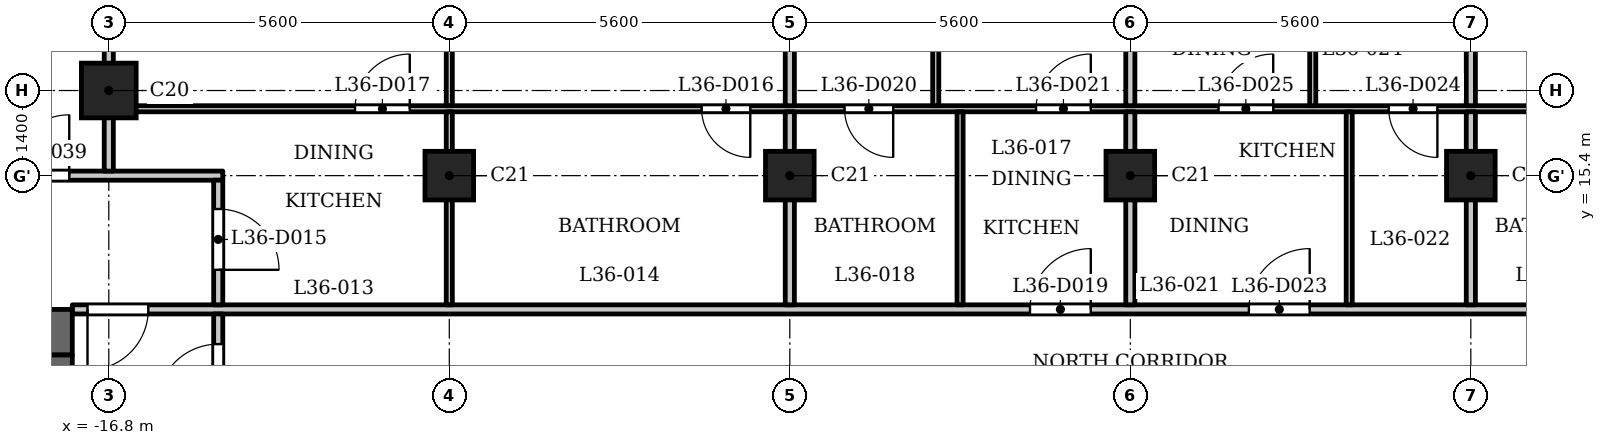
"""IFC4 building model, lengths in metres.
Left out: names, types, materials, properties, quantities, classifications, styles, units other than length and angle.
Written with IfcOpenShell. Run it as: python <this file> out.ifc"""

import sys

from ifc_helpers import new_model, si_unit, direction, frame, frame_2d, origin, origin_2d, place, context, subcontext, project, spatial, rectangle, extrude, element, fill, save


model = new_model("IFC4")
c1 = context("Model", 3, precision=1e-05, world=origin(), true_north=direction((0.0, 1.0)))
c2 = subcontext(c1, "Body", "Model", "MODEL_VIEW")
j1 = project(units=[si_unit("LENGTHUNIT", "METRE"), si_unit("PLANEANGLEUNIT", "RADIAN")], contexts=[c1])
p1 = place(None, origin())
s1 = spatial("IfcSite", under=j1, at=p1, CompositionType="ELEMENT")
p2 = place(p1, origin())
s2 = spatial("IfcBuilding", under=s1, at=p2, CompositionType="ELEMENT")
p3 = place(p2, frame((0.0, 0.0, 143.1)))
s3 = spatial("IfcBuildingStorey", under=s2, at=p3, CompositionType="ELEMENT", Elevation=143.1)
p4 = place(p3, frame((-16.8, 16.8, 0.0), z_axis=(0.0, 0.0, 1.0), x_axis=(1.0, 0.0, 0.0)))
e1 = element("IfcColumn", 1, at=p4, inside=s3, PredefinedType="COLUMN", context=c2, shape_type="SweptSolid", body=[
    extrude(rectangle(XDim=0.9, YDim=0.9, at=origin_2d()), origin(), (0.0, 0.0, 1.0), 3.5),
])
for number, where, z_axis, x_axis in (
    (2, (-11.2, 15.4, 0.0), (0.0, 0.0, 1.0), (1.0, 0.0, 0.0)),
    (3, (-5.6, 15.4, 0.0), (0.0, 0.0, 1.0), (1.0, 0.0, 0.0)),
    (4, (0.0, 15.4, 0.0), (0.0, 0.0, 1.0), (1.0, 0.0, 0.0)),
    (5, (5.6, 15.4, 0.0), (0.0, 0.0, 1.0), (1.0, 0.0, 0.0)),
):
    element("IfcColumn", number, at=place(p3, frame(where, z_axis=z_axis, x_axis=x_axis)), inside=s3, PredefinedType="COLUMN", context=c2, shape_type="SweptSolid", body=[
        extrude(rectangle(XDim=0.8, YDim=0.8, at=origin_2d()), origin(), (0.0, 0.0, 1.0), 3.5),
    ])
p5 = place(p3, frame((-17.4, 12.825, 0.0), z_axis=(0.0, 0.0, 1.0), x_axis=(-1.0, 0.0, 0.0)))
e6 = element("IfcWall", 6, at=p5, inside=s3, PredefinedType="SHEAR", context=c2, shape_type="SweptSolid", body=[
    extrude(rectangle(XDim=10.4, YDim=0.75, at=frame_2d((5.2, 0.0))), origin(), (0.0, 0.0, 1.0), 3.2),
])
p6 = place(p3, frame((-17.6, -12.45, 0.0), z_axis=(0.0, 0.0, 1.0), x_axis=(0.0, 1.0, 0.0)))
e7 = element("IfcWall", 7, at=p6, inside=s3, PredefinedType="SHEAR", context=c2, shape_type="SweptSolid", body=[
    extrude(rectangle(XDim=24.9, YDim=0.4, at=frame_2d((12.45, 0.0))), origin(), (0.0, 0.0, 1.0), 3.2),
])
p7 = place(p6, frame((8.65, 0.0, 0.0)))
e8 = element("IfcOpeningElement", 8, at=p7, cuts=e7, PredefinedType="OPENING", context=c2, shape_type="SweptSolid", body=[
    extrude(rectangle(XDim=0.9, YDim=2.1, at=frame_2d((0.45, 1.05))), frame((0.0, 0.21, 0.0), z_axis=(0.0, -1.0, 0.0), x_axis=(1.0, 0.0, 0.0)), (0.0, 0.0, 1.0), 0.42),
])
p8 = place(p6, frame((15.6, 0.0, 0.0)))
e9 = element("IfcOpeningElement", 9, at=p8, cuts=e7, PredefinedType="OPENING", context=c2, shape_type="SweptSolid", body=[
    extrude(rectangle(XDim=1.1, YDim=2.1, at=frame_2d((0.55, 1.05))), frame((0.0, 0.21, 0.0), z_axis=(0.0, -1.0, 0.0), x_axis=(1.0, 0.0, 0.0)), (0.0, 0.0, 1.0), 0.42),
])
p9 = place(p6, frame((18.0, 0.0, 0.0)))
e10 = element("IfcOpeningElement", 10, at=p9, cuts=e7, PredefinedType="OPENING", context=c2, shape_type="SweptSolid", body=[
    extrude(rectangle(XDim=1.1, YDim=2.1, at=frame_2d((0.55, 1.05))), frame((0.0, 0.21, 0.0), z_axis=(0.0, -1.0, 0.0), x_axis=(1.0, 0.0, 0.0)), (0.0, 0.0, 1.0), 0.42),
])
p10 = place(p6, frame((23.025, 0.0, 0.0)))
e11 = element("IfcOpeningElement", 11, at=p10, cuts=e7, PredefinedType="OPENING", context=c2, shape_type="SweptSolid", body=[
    extrude(rectangle(XDim=1.1, YDim=2.1, at=frame_2d((0.55, 1.05))), frame((0.0, 0.21, 0.0), z_axis=(0.0, -1.0, 0.0), x_axis=(1.0, 0.0, 0.0)), (0.0, 0.0, 1.0), 0.42),
])
p11 = place(p6, frame((0.775, 0.0, 0.0)))
e12 = element("IfcOpeningElement", 12, at=p11, cuts=e7, PredefinedType="OPENING", context=c2, shape_type="SweptSolid", body=[
    extrude(rectangle(XDim=1.1, YDim=2.1, at=frame_2d((0.55, 1.05))), frame((0.0, 0.21, 0.0), z_axis=(0.0, -1.0, 0.0), x_axis=(1.0, 0.0, 0.0)), (0.0, 0.0, 1.0), 0.42),
])
p12 = place(p6, frame((12.925, 0.0, 0.0)))
e13 = element("IfcOpeningElement", 13, at=p12, cuts=e7, PredefinedType="OPENING", context=c2, shape_type="SweptSolid", body=[
    extrude(rectangle(XDim=1.8, YDim=2.1, at=frame_2d((0.9, 1.05))), frame((0.0, 0.21, 0.0), z_axis=(0.0, -1.0, 0.0), x_axis=(1.0, 0.0, 0.0)), (0.0, 0.0, 1.0), 0.42),
])
p13 = place(p3, frame((-17.4, 13.2, 0.0), z_axis=(0.0, 0.0, 1.0), x_axis=(1.0, 0.0, 0.0)))
e14 = element("IfcWall", 14, at=p13, inside=s3, PredefinedType="PARTITIONING", context=c2, shape_type="SweptSolid", body=[
    extrude(rectangle(XDim=34.8, YDim=0.15, at=frame_2d((17.4, 0.0))), origin(), (0.0, 0.0, 1.0), 3.2),
])
p14 = place(p13, frame((0.25, 0.0, 0.0)))
e15 = element("IfcOpeningElement", 15, at=p14, cuts=e14, PredefinedType="OPENING", context=c2, shape_type="SweptSolid", body=[
    extrude(rectangle(XDim=1.0, YDim=2.1, at=frame_2d((0.5, 1.05))), frame((0.0, 0.085, 0.0), z_axis=(0.0, -1.0, 0.0), x_axis=(1.0, 0.0, 0.0)), (0.0, 0.0, 1.0), 0.17),
])
p15 = place(p13, frame((33.65, 0.0, 0.0)))
e16 = element("IfcOpeningElement", 16, at=p15, cuts=e14, PredefinedType="OPENING", context=c2, shape_type="SweptSolid", body=[
    extrude(rectangle(XDim=1.0, YDim=2.1, at=frame_2d((0.5, 1.05))), frame((0.0, 0.085, 0.0), z_axis=(0.0, -1.0, 0.0), x_axis=(1.0, 0.0, 0.0)), (0.0, 0.0, 1.0), 0.17),
])
p16 = place(p13, frame((15.75, 0.0, 0.0)))
e17 = element("IfcOpeningElement", 17, at=p16, cuts=e14, PredefinedType="OPENING", context=c2, shape_type="SweptSolid", body=[
    extrude(rectangle(XDim=1.0, YDim=2.1, at=frame_2d((0.5, 1.05))), frame((0.0, 0.085, 0.0), z_axis=(0.0, -1.0, 0.0), x_axis=(1.0, 0.0, 0.0)), (0.0, 0.0, 1.0), 0.17),
])
p17 = place(p13, frame((19.35, 0.0, 0.0)))
e18 = element("IfcOpeningElement", 18, at=p17, cuts=e14, PredefinedType="OPENING", context=c2, shape_type="SweptSolid", body=[
    extrude(rectangle(XDim=1.0, YDim=2.1, at=frame_2d((0.5, 1.05))), frame((0.0, 0.085, 0.0), z_axis=(0.0, -1.0, 0.0), x_axis=(1.0, 0.0, 0.0)), (0.0, 0.0, 1.0), 0.17),
])
p18 = place(p13, frame((26.95, 0.0, 0.0)))
e19 = element("IfcOpeningElement", 19, at=p18, cuts=e14, PredefinedType="OPENING", context=c2, shape_type="SweptSolid", body=[
    extrude(rectangle(XDim=1.0, YDim=2.1, at=frame_2d((0.5, 1.05))), frame((0.0, 0.085, 0.0), z_axis=(0.0, -1.0, 0.0), x_axis=(1.0, 0.0, 0.0)), (0.0, 0.0, 1.0), 0.17),
])
p19 = place(p13, frame((29.75, 0.0, 0.0)))
e20 = element("IfcOpeningElement", 20, at=p19, cuts=e14, PredefinedType="OPENING", context=c2, shape_type="SweptSolid", body=[
    extrude(rectangle(XDim=1.0, YDim=2.1, at=frame_2d((0.5, 1.05))), frame((0.0, 0.085, 0.0), z_axis=(0.0, -1.0, 0.0), x_axis=(1.0, 0.0, 0.0)), (0.0, 0.0, 1.0), 0.17),
])
p20 = place(p3, frame((-27.484, 15.4, 0.0), z_axis=(0.0, 0.0, 1.0), x_axis=(1.0, 0.0, 0.0)))
e21 = element("IfcWall", 21, at=p20, inside=s3, PredefinedType="PARTITIONING", context=c2, shape_type="SweptSolid", body=[
    extrude(rectangle(XDim=12.559, YDim=0.15, at=frame_2d((6.279, 0.0))), origin(), (0.0, 0.0, 1.0), 3.2),
])
p21 = place(p20, frame((9.034, 0.0, 0.0)))
e22 = element("IfcOpeningElement", 22, at=p21, cuts=e21, PredefinedType="OPENING", context=c2, shape_type="SweptSolid", body=[
    extrude(rectangle(XDim=1.0, YDim=2.1, at=frame_2d((0.5, 1.05))), frame((0.0, 0.085, 0.0), z_axis=(0.0, -1.0, 0.0), x_axis=(1.0, 0.0, 0.0)), (0.0, 0.0, 1.0), 0.17),
])
p22 = place(p3, frame((-16.725, 16.5, 0.0), z_axis=(0.0, 0.0, 1.0), x_axis=(1.0, 0.0, 0.0)))
e23 = element("IfcWall", 23, at=p22, inside=s3, PredefinedType="PARTITIONING", context=c2, shape_type="SweptSolid", body=[
    extrude(rectangle(XDim=33.45, YDim=0.1, at=frame_2d((16.725, 0.0))), origin(), (0.0, 0.0, 1.0), 3.2),
])
p23 = place(p22, frame((9.675, 0.0, 0.0)))
e24 = element("IfcOpeningElement", 24, at=p23, cuts=e23, PredefinedType="OPENING", context=c2, shape_type="SweptSolid", body=[
    extrude(rectangle(XDim=0.8, YDim=2.1, at=frame_2d((0.4, 1.05))), frame((0.0, 0.06, 0.0), z_axis=(0.0, -1.0, 0.0), x_axis=(1.0, 0.0, 0.0)), (0.0, 0.0, 1.0), 0.12),
])
p24 = place(p22, frame((3.975, 0.0, 0.0)))
e25 = element("IfcOpeningElement", 25, at=p24, cuts=e23, PredefinedType="OPENING", context=c2, shape_type="SweptSolid", body=[
    extrude(rectangle(XDim=0.9, YDim=2.1, at=frame_2d((0.45, 1.05))), frame((0.0, 0.06, 0.0), z_axis=(0.0, -1.0, 0.0), x_axis=(1.0, 0.0, 0.0)), (0.0, 0.0, 1.0), 0.12),
])
p25 = place(p22, frame((12.025, 0.0, 0.0)))
e26 = element("IfcOpeningElement", 26, at=p25, cuts=e23, PredefinedType="OPENING", context=c2, shape_type="SweptSolid", body=[
    extrude(rectangle(XDim=0.8, YDim=2.1, at=frame_2d((0.4, 1.05))), frame((0.0, 0.06, 0.0), z_axis=(0.0, -1.0, 0.0), x_axis=(1.0, 0.0, 0.0)), (0.0, 0.0, 1.0), 0.12),
])
p26 = place(p22, frame((15.175, 0.0, 0.0)))
e27 = element("IfcOpeningElement", 27, at=p26, cuts=e23, PredefinedType="OPENING", context=c2, shape_type="SweptSolid", body=[
    extrude(rectangle(XDim=0.9, YDim=2.1, at=frame_2d((0.45, 1.05))), frame((0.0, 0.06, 0.0), z_axis=(0.0, -1.0, 0.0), x_axis=(1.0, 0.0, 0.0)), (0.0, 0.0, 1.0), 0.12),
])
p27 = place(p22, frame((20.975, 0.0, 0.0)))
e28 = element("IfcOpeningElement", 28, at=p27, cuts=e23, PredefinedType="OPENING", context=c2, shape_type="SweptSolid", body=[
    extrude(rectangle(XDim=0.8, YDim=2.1, at=frame_2d((0.4, 1.05))), frame((0.0, 0.06, 0.0), z_axis=(0.0, -1.0, 0.0), x_axis=(1.0, 0.0, 0.0)), (0.0, 0.0, 1.0), 0.12),
])
p28 = place(p22, frame((18.175, 0.0, 0.0)))
e29 = element("IfcOpeningElement", 29, at=p28, cuts=e23, PredefinedType="OPENING", context=c2, shape_type="SweptSolid", body=[
    extrude(rectangle(XDim=0.9, YDim=2.1, at=frame_2d((0.45, 1.05))), frame((0.0, 0.06, 0.0), z_axis=(0.0, -1.0, 0.0), x_axis=(1.0, 0.0, 0.0)), (0.0, 0.0, 1.0), 0.12),
])
p29 = place(p22, frame((23.725, 0.0, 0.0)))
e30 = element("IfcOpeningElement", 30, at=p29, cuts=e23, PredefinedType="OPENING", context=c2, shape_type="SweptSolid", body=[
    extrude(rectangle(XDim=0.8, YDim=2.1, at=frame_2d((0.4, 1.05))), frame((0.0, 0.06, 0.0), z_axis=(0.0, -1.0, 0.0), x_axis=(1.0, 0.0, 0.0)), (0.0, 0.0, 1.0), 0.12),
])
p30 = place(p22, frame((26.125, 0.0, 0.0)))
e31 = element("IfcOpeningElement", 31, at=p30, cuts=e23, PredefinedType="OPENING", context=c2, shape_type="SweptSolid", body=[
    extrude(rectangle(XDim=0.9, YDim=2.1, at=frame_2d((0.45, 1.05))), frame((0.0, 0.06, 0.0), z_axis=(0.0, -1.0, 0.0), x_axis=(1.0, 0.0, 0.0)), (0.0, 0.0, 1.0), 0.12),
])
p31 = place(p22, frame((32.125, 0.0, 0.0)))
e32 = element("IfcOpeningElement", 32, at=p31, cuts=e23, PredefinedType="OPENING", context=c2, shape_type="SweptSolid", body=[
    extrude(rectangle(XDim=0.8, YDim=2.1, at=frame_2d((0.4, 1.05))), frame((0.0, 0.06, 0.0), z_axis=(0.0, -1.0, 0.0), x_axis=(1.0, 0.0, 0.0)), (0.0, 0.0, 1.0), 0.12),
])
p32 = place(p22, frame((28.975, 0.0, 0.0)))
e33 = element("IfcOpeningElement", 33, at=p32, cuts=e23, PredefinedType="OPENING", context=c2, shape_type="SweptSolid", body=[
    extrude(rectangle(XDim=0.9, YDim=2.1, at=frame_2d((0.45, 1.05))), frame((0.0, 0.06, 0.0), z_axis=(0.0, -1.0, 0.0), x_axis=(1.0, 0.0, 0.0)), (0.0, 0.0, 1.0), 0.12),
])
p33 = place(p3, frame((-16.8, 15.475, 0.0), z_axis=(0.0, 0.0, 1.0), x_axis=(0.0, 1.0, 0.0)))
e34 = element("IfcWall", 34, at=p33, inside=s3, PredefinedType="PARTITIONING", context=c2, shape_type="SweptSolid", body=[
    extrude(rectangle(XDim=7.455, YDim=0.15, at=frame_2d((3.728, 0.0))), origin(), (0.0, 0.0, 1.0), 3.2),
])
p34 = place(p3, frame((-15.0, 6.769, 0.0), z_axis=(0.0, 0.0, 1.0), x_axis=(0.0, 1.0, 0.0)))
e35 = element("IfcWall", 35, at=p34, inside=s3, PredefinedType="PARTITIONING", context=c2, shape_type="SweptSolid", body=[
    extrude(rectangle(XDim=6.356, YDim=0.15, at=frame_2d((3.178, 0.0))), origin(), (0.0, 0.0, 1.0), 3.2),
])
p35 = place(p34, frame((4.86, 0.0, 0.0)))
e36 = element("IfcOpeningElement", 36, at=p35, cuts=e35, PredefinedType="OPENING", context=c2, shape_type="SweptSolid", body=[
    extrude(rectangle(XDim=1.0, YDim=2.1, at=frame_2d((0.5, 1.05))), frame((0.0, 0.085, 0.0), z_axis=(0.0, -1.0, 0.0), x_axis=(1.0, 0.0, 0.0)), (0.0, 0.0, 1.0), 0.17),
])
p36 = place(p3, frame((-15.0, 13.275, 0.0), z_axis=(0.0, 0.0, 1.0), x_axis=(0.0, 1.0, 0.0)))
e37 = element("IfcWall", 37, at=p36, inside=s3, PredefinedType="PARTITIONING", context=c2, shape_type="SweptSolid", body=[
    extrude(rectangle(XDim=2.05, YDim=0.15, at=frame_2d((1.025, 0.0))), origin(), (0.0, 0.0, 1.0), 3.2),
])
p37 = place(p36, frame((0.576, 0.0, 0.0)))
e38 = element("IfcOpeningElement", 38, at=p37, cuts=e37, PredefinedType="OPENING", context=c2, shape_type="SweptSolid", body=[
    extrude(rectangle(XDim=1.0, YDim=2.1, at=frame_2d((0.5, 1.05))), frame((0.0, 0.085, 0.0), z_axis=(0.0, -1.0, 0.0), x_axis=(1.0, 0.0, 0.0)), (0.0, 0.0, 1.0), 0.17),
])
p38 = place(p3, frame((-11.2, 13.275, 0.0), z_axis=(0.0, 0.0, 1.0), x_axis=(0.0, 1.0, 0.0)))
e39 = element("IfcWall", 39, at=p38, inside=s3, PredefinedType="PARTITIONING", context=c2, shape_type="SweptSolid", body=[
    extrude(rectangle(XDim=3.175, YDim=0.1, at=frame_2d((1.587, 0.0))), origin(), (0.0, 0.0, 1.0), 3.2),
])
p39 = place(p3, frame((-11.2, 16.55, 0.0), z_axis=(0.0, 0.0, 1.0), x_axis=(0.0, 1.0, 0.0)))
e40 = element("IfcWall", 40, at=p39, inside=s3, PredefinedType="PARTITIONING", context=c2, shape_type="SweptSolid", body=[
    extrude(rectangle(XDim=6.38, YDim=0.1, at=frame_2d((3.19, 0.0))), origin(), (0.0, 0.0, 1.0), 3.2),
])
p40 = place(p39, frame((4.1, 0.0, 0.0)))
e41 = element("IfcOpeningElement", 41, at=p40, cuts=e40, PredefinedType="OPENING", context=c2, shape_type="SweptSolid", body=[
    extrude(rectangle(XDim=0.9, YDim=2.1, at=frame_2d((0.45, 1.05))), frame((0.0, 0.06, 0.0), z_axis=(0.0, -1.0, 0.0), x_axis=(1.0, 0.0, 0.0)), (0.0, 0.0, 1.0), 0.12),
])
p41 = place(p3, frame((-5.6, 13.275, 0.0), z_axis=(0.0, 0.0, 1.0), x_axis=(0.0, 1.0, 0.0)))
e42 = element("IfcWall", 42, at=p41, inside=s3, PredefinedType="PARTITIONING", context=c2, shape_type="SweptSolid", body=[
    extrude(rectangle(XDim=3.175, YDim=0.15, at=frame_2d((1.587, 0.0))), origin(), (0.0, 0.0, 1.0), 3.2),
])
p42 = place(p3, frame((-5.6, 16.55, 0.0), z_axis=(0.0, 0.0, 1.0), x_axis=(0.0, 1.0, 0.0)))
e43 = element("IfcWall", 43, at=p42, inside=s3, PredefinedType="PARTITIONING", context=c2, shape_type="SweptSolid", body=[
    extrude(rectangle(XDim=6.38, YDim=0.15, at=frame_2d((3.19, 0.0))), origin(), (0.0, 0.0, 1.0), 3.2),
])
p43 = place(p3, frame((-3.2, 16.55, 0.0), z_axis=(0.0, 0.0, 1.0), x_axis=(0.0, 1.0, 0.0)))
e44 = element("IfcWall", 44, at=p43, inside=s3, PredefinedType="PARTITIONING", context=c2, shape_type="SweptSolid", body=[
    extrude(rectangle(XDim=5.53, YDim=0.1, at=frame_2d((2.765, 0.0))), origin(), (0.0, 0.0, 1.0), 3.2),
])
p44 = place(p43, frame((1.46, 0.0, 0.0)))
e45 = element("IfcOpeningElement", 45, at=p44, cuts=e44, PredefinedType="OPENING", context=c2, shape_type="SweptSolid", body=[
    extrude(rectangle(XDim=0.9, YDim=2.1, at=frame_2d((0.45, 1.05))), frame((0.0, 0.06, 0.0), z_axis=(0.0, -1.0, 0.0), x_axis=(1.0, 0.0, 0.0)), (0.0, 0.0, 1.0), 0.12),
])
p45 = place(p3, frame((-2.8, 13.275, 0.0), z_axis=(0.0, 0.0, 1.0), x_axis=(0.0, 1.0, 0.0)))
e46 = element("IfcWall", 46, at=p45, inside=s3, PredefinedType="PARTITIONING", context=c2, shape_type="SweptSolid", body=[
    extrude(rectangle(XDim=3.175, YDim=0.1, at=frame_2d((1.587, 0.0))), origin(), (0.0, 0.0, 1.0), 3.2),
])
p46 = place(p3, frame((0.0, 13.275, 0.0), z_axis=(0.0, 0.0, 1.0), x_axis=(0.0, 1.0, 0.0)))
e47 = element("IfcWall", 47, at=p46, inside=s3, PredefinedType="PARTITIONING", context=c2, shape_type="SweptSolid", body=[
    extrude(rectangle(XDim=3.175, YDim=0.15, at=frame_2d((1.587, 0.0))), origin(), (0.0, 0.0, 1.0), 3.2),
])
p47 = place(p3, frame((0.0, 16.55, 0.0), z_axis=(0.0, 0.0, 1.0), x_axis=(0.0, 1.0, 0.0)))
e48 = element("IfcWall", 48, at=p47, inside=s3, PredefinedType="PARTITIONING", context=c2, shape_type="SweptSolid", body=[
    extrude(rectangle(XDim=6.38, YDim=0.15, at=frame_2d((3.19, 0.0))), origin(), (0.0, 0.0, 1.0), 3.2),
])
p48 = place(p3, frame((3.0, 16.55, 0.0), z_axis=(0.0, 0.0, 1.0), x_axis=(0.0, 1.0, 0.0)))
e49 = element("IfcWall", 49, at=p48, inside=s3, PredefinedType="PARTITIONING", context=c2, shape_type="SweptSolid", body=[
    extrude(rectangle(XDim=5.53, YDim=0.1, at=frame_2d((2.765, 0.0))), origin(), (0.0, 0.0, 1.0), 3.2),
])
p49 = place(p48, frame((4.35, 0.0, 0.0)))
e50 = element("IfcOpeningElement", 50, at=p49, cuts=e49, PredefinedType="OPENING", context=c2, shape_type="SweptSolid", body=[
    extrude(rectangle(XDim=0.9, YDim=2.1, at=frame_2d((0.45, 1.05))), frame((0.0, 0.06, 0.0), z_axis=(0.0, -1.0, 0.0), x_axis=(1.0, 0.0, 0.0)), (0.0, 0.0, 1.0), 0.12),
])
p50 = place(p3, frame((3.6, 13.275, 0.0), z_axis=(0.0, 0.0, 1.0), x_axis=(0.0, 1.0, 0.0)))
e51 = element("IfcWall", 51, at=p50, inside=s3, PredefinedType="PARTITIONING", context=c2, shape_type="SweptSolid", body=[
    extrude(rectangle(XDim=3.175, YDim=0.1, at=frame_2d((1.587, 0.0))), origin(), (0.0, 0.0, 1.0), 3.2),
])
p51 = place(p3, frame((5.6, 13.275, 0.0), z_axis=(0.0, 0.0, 1.0), x_axis=(0.0, 1.0, 0.0)))
e52 = element("IfcWall", 52, at=p51, inside=s3, PredefinedType="PARTITIONING", context=c2, shape_type="SweptSolid", body=[
    extrude(rectangle(XDim=3.175, YDim=0.15, at=frame_2d((1.587, 0.0))), origin(), (0.0, 0.0, 1.0), 3.2),
])
p52 = place(p3, frame((5.6, 16.55, 0.0), z_axis=(0.0, 0.0, 1.0), x_axis=(0.0, 1.0, 0.0)))
e53 = element("IfcWall", 53, at=p52, inside=s3, PredefinedType="PARTITIONING", context=c2, shape_type="SweptSolid", body=[
    extrude(rectangle(XDim=6.38, YDim=0.15, at=frame_2d((3.19, 0.0))), origin(), (0.0, 0.0, 1.0), 3.2),
])
p53 = place(p35, origin())
e54 = element("IfcDoor", 54, at=p53, inside=s3, OperationType="SINGLE_SWING_RIGHT", PredefinedType="DOOR", context=c2, shape_type="SweptSolid", body=[
    extrude(rectangle(XDim=1.0, YDim=2.1, at=frame_2d((0.5, 1.05))), frame((0.0, 0.025, 0.0), z_axis=(0.0, -1.0, 0.0), x_axis=(1.0, 0.0, 0.0)), (0.0, 0.0, 1.0), 0.05),
])
fill(e36, e54)
p54 = place(p14, origin())
e55 = element("IfcDoor", 55, at=p54, inside=s3, OperationType="SINGLE_SWING_LEFT", PredefinedType="DOOR", context=c2, shape_type="SweptSolid", body=[
    extrude(rectangle(XDim=1.0, YDim=2.1, at=frame_2d((0.5, 1.05))), frame((0.0, 0.025, 0.0), z_axis=(0.0, -1.0, 0.0), x_axis=(1.0, 0.0, 0.0)), (0.0, 0.0, 1.0), 0.05),
])
fill(e15, e55)
p55 = place(p37, origin())
e56 = element("IfcDoor", 56, at=p55, inside=s3, OperationType="SINGLE_SWING_LEFT", PredefinedType="DOOR", context=c2, shape_type="SweptSolid", body=[
    extrude(rectangle(XDim=1.0, YDim=2.1, at=frame_2d((0.5, 1.05))), frame((0.0, 0.025, 0.0), z_axis=(0.0, -1.0, 0.0), x_axis=(1.0, 0.0, 0.0)), (0.0, 0.0, 1.0), 0.05),
])
fill(e38, e56)
p56 = place(p23, origin())
e57 = element("IfcDoor", 57, at=p56, inside=s3, OperationType="SINGLE_SWING_RIGHT", PredefinedType="DOOR", context=c2, shape_type="SweptSolid", body=[
    extrude(rectangle(XDim=0.8, YDim=2.1, at=frame_2d((0.4, 1.05))), frame((0.0, 0.025, 0.0), z_axis=(0.0, -1.0, 0.0), x_axis=(1.0, 0.0, 0.0)), (0.0, 0.0, 1.0), 0.05),
])
fill(e24, e57)
p57 = place(p24, origin())
e58 = element("IfcDoor", 58, at=p57, inside=s3, OperationType="SINGLE_SWING_LEFT", PredefinedType="DOOR", context=c2, shape_type="SweptSolid", body=[
    extrude(rectangle(XDim=0.9, YDim=2.1, at=frame_2d((0.45, 1.05))), frame((0.0, 0.025, 0.0), z_axis=(0.0, -1.0, 0.0), x_axis=(1.0, 0.0, 0.0)), (0.0, 0.0, 1.0), 0.05),
])
fill(e25, e58)
p58 = place(p16, origin())
e59 = element("IfcDoor", 59, at=p58, inside=s3, OperationType="SINGLE_SWING_LEFT", PredefinedType="DOOR", context=c2, shape_type="SweptSolid", body=[
    extrude(rectangle(XDim=1.0, YDim=2.1, at=frame_2d((0.5, 1.05))), frame((0.0, 0.025, 0.0), z_axis=(0.0, -1.0, 0.0), x_axis=(1.0, 0.0, 0.0)), (0.0, 0.0, 1.0), 0.05),
])
fill(e17, e59)
p59 = place(p25, origin())
e60 = element("IfcDoor", 60, at=p59, inside=s3, OperationType="SINGLE_SWING_RIGHT", PredefinedType="DOOR", context=c2, shape_type="SweptSolid", body=[
    extrude(rectangle(XDim=0.8, YDim=2.1, at=frame_2d((0.4, 1.05))), frame((0.0, 0.025, 0.0), z_axis=(0.0, -1.0, 0.0), x_axis=(1.0, 0.0, 0.0)), (0.0, 0.0, 1.0), 0.05),
])
fill(e26, e60)
p60 = place(p26, origin())
e61 = element("IfcDoor", 61, at=p60, inside=s3, OperationType="SINGLE_SWING_LEFT", PredefinedType="DOOR", context=c2, shape_type="SweptSolid", body=[
    extrude(rectangle(XDim=0.9, YDim=2.1, at=frame_2d((0.45, 1.05))), frame((0.0, 0.025, 0.0), z_axis=(0.0, -1.0, 0.0), x_axis=(1.0, 0.0, 0.0)), (0.0, 0.0, 1.0), 0.05),
])
fill(e27, e61)
p61 = place(p17, origin())
e62 = element("IfcDoor", 62, at=p61, inside=s3, OperationType="SINGLE_SWING_LEFT", PredefinedType="DOOR", context=c2, shape_type="SweptSolid", body=[
    extrude(rectangle(XDim=1.0, YDim=2.1, at=frame_2d((0.5, 1.05))), frame((0.0, 0.025, 0.0), z_axis=(0.0, -1.0, 0.0), x_axis=(1.0, 0.0, 0.0)), (0.0, 0.0, 1.0), 0.05),
])
fill(e18, e62)
p62 = place(p27, origin())
e63 = element("IfcDoor", 63, at=p62, inside=s3, OperationType="SINGLE_SWING_RIGHT", PredefinedType="DOOR", context=c2, shape_type="SweptSolid", body=[
    extrude(rectangle(XDim=0.8, YDim=2.1, at=frame_2d((0.4, 1.05))), frame((0.0, 0.025, 0.0), z_axis=(0.0, -1.0, 0.0), x_axis=(1.0, 0.0, 0.0)), (0.0, 0.0, 1.0), 0.05),
])
fill(e28, e63)
p63 = place(p28, origin())
e64 = element("IfcDoor", 64, at=p63, inside=s3, OperationType="SINGLE_SWING_LEFT", PredefinedType="DOOR", context=c2, shape_type="SweptSolid", body=[
    extrude(rectangle(XDim=0.9, YDim=2.1, at=frame_2d((0.45, 1.05))), frame((0.0, 0.025, 0.0), z_axis=(0.0, -1.0, 0.0), x_axis=(1.0, 0.0, 0.0)), (0.0, 0.0, 1.0), 0.05),
])
fill(e29, e64)
p64 = place(p21, origin())
e65 = element("IfcDoor", 65, at=p64, inside=s3, OperationType="SINGLE_SWING_LEFT", PredefinedType="DOOR", context=c2, shape_type="SweptSolid", body=[
    extrude(rectangle(XDim=1.0, YDim=2.1, at=frame_2d((0.5, 1.05))), frame((0.0, 0.025, 0.0), z_axis=(0.0, -1.0, 0.0), x_axis=(1.0, 0.0, 0.0)), (0.0, 0.0, 1.0), 0.05),
])
fill(e22, e65)
save(model, sys.argv[1])
